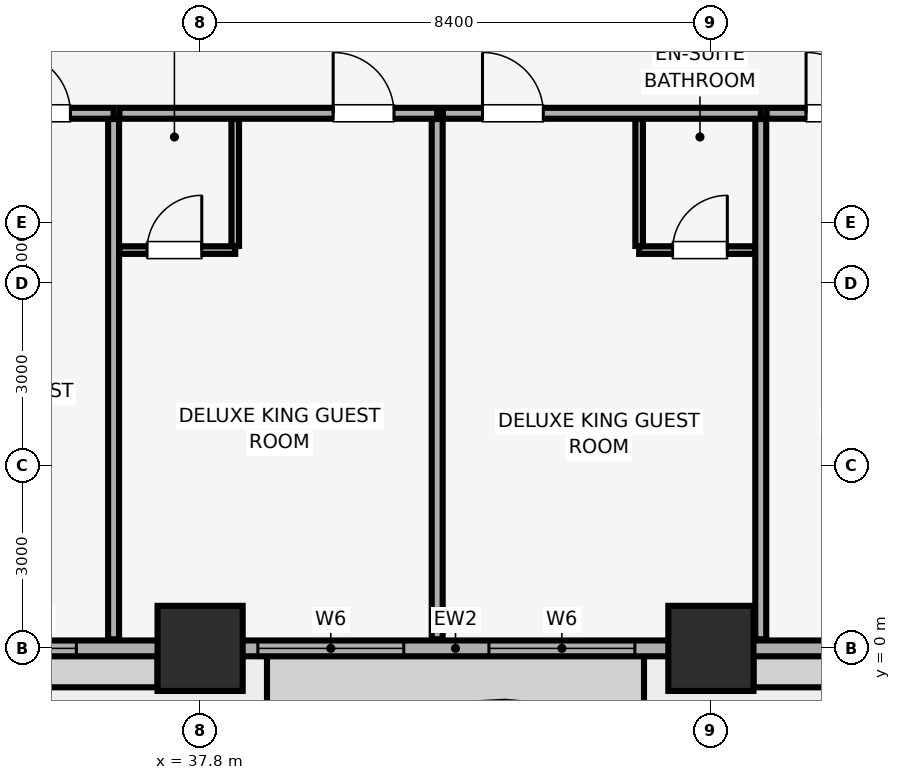
"""IFC4 building model, lengths in metres.
Left out: names, types, materials, properties, quantities, classifications, styles, units other than length and angle.
Written with IfcOpenShell. Run it as: python <this file> out.ifc"""

import sys

from ifc_helpers import new_model, si_unit, direction, frame, frame_2d, origin, origin_2d, place, context, subcontext, project, spatial, rectangle, extrude, element, fill, save


model = new_model("IFC4")
c1 = context("Model", 3, precision=1e-05, world=origin(), true_north=direction((0.0, 1.0)))
c2 = subcontext(c1, "Body", "Model", "MODEL_VIEW")
j1 = project(units=[si_unit("LENGTHUNIT", "METRE"), si_unit("PLANEANGLEUNIT", "RADIAN")], contexts=[c1])
p1 = place(None, origin())
s1 = spatial("IfcSite", under=j1, at=p1, CompositionType="ELEMENT")
p2 = place(p1, origin())
s2 = spatial("IfcBuilding", under=s1, at=p2, CompositionType="ELEMENT")
p3 = place(p2, frame((0.0, 0.0, 31.4)))
s3 = spatial("IfcBuildingStorey", under=s2, at=p3, CompositionType="ELEMENT", Elevation=31.4)
for number, where, z_axis, x_axis in (
    (1, (37.8, 0.0, 0.0), (0.0, 0.0, 1.0), (1.0, 0.0, 0.0)),
    (2, (46.2, 0.0, 0.0), (0.0, 0.0, 1.0), (1.0, 0.0, 0.0)),
):
    element("IfcColumn", number, at=place(p3, frame(where, z_axis=z_axis, x_axis=x_axis)), inside=s3, PredefinedType="COLUMN", context=c2, shape_type="SweptSolid", body=[
        extrude(rectangle(XDim=1.4, YDim=1.4, at=origin_2d()), origin(), (0.0, 0.0, 1.0), 3.51),
    ])
p4 = place(p3, frame((4.2, 0.0, 0.0), z_axis=(0.0, 0.0, 1.0), x_axis=(1.0, 0.0, 0.0)))
e3 = element("IfcWall", 3, at=p4, inside=s3, PredefinedType="SOLIDWALL", context=c2, shape_type="SweptSolid", body=[
    extrude(rectangle(XDim=75.6, YDim=0.26, at=frame_2d((37.8, 0.0))), origin(), (0.0, 0.0, 1.0), 2.56),
])
p5 = place(p4, frame((13.517, 0.0, 0.0)))
e4 = element("IfcOpeningElement", 4, at=p5, cuts=e3, PredefinedType="OPENING", context=c2, shape_type="SweptSolid", body=[
    extrude(rectangle(XDim=1.1, YDim=2.15, at=frame_2d((0.55, 1.075))), frame((0.0, 0.14, 0.0), z_axis=(0.0, -1.0, 0.0), x_axis=(1.0, 0.0, 0.0)), (0.0, 0.0, 1.0), 0.28),
])
p6 = place(p4, frame((28.183, 0.0, 0.0)))
e5 = element("IfcOpeningElement", 5, at=p6, cuts=e3, PredefinedType="OPENING", context=c2, shape_type="SweptSolid", body=[
    extrude(rectangle(XDim=1.1, YDim=2.15, at=frame_2d((0.55, 1.075))), frame((0.0, 0.14, 0.0), z_axis=(0.0, -1.0, 0.0), x_axis=(1.0, 0.0, 0.0)), (0.0, 0.0, 1.0), 0.28),
])
p7 = place(p4, frame((60.983, 0.0, 0.0)))
e6 = element("IfcOpeningElement", 6, at=p7, cuts=e3, PredefinedType="OPENING", context=c2, shape_type="SweptSolid", body=[
    extrude(rectangle(XDim=1.1, YDim=2.15, at=frame_2d((0.55, 1.075))), frame((0.0, 0.14, 0.0), z_axis=(0.0, -1.0, 0.0), x_axis=(1.0, 0.0, 0.0)), (0.0, 0.0, 1.0), 0.28),
])
p8 = place(p4, frame((1.035, 0.0, 0.85)))
e7 = element("IfcOpeningElement", 7, at=p8, cuts=e3, PredefinedType="OPENING", context=c2, shape_type="SweptSolid", body=[
    extrude(rectangle(XDim=2.4, YDim=1.5, at=frame_2d((1.2, 0.75))), frame((0.0, 0.14, 0.0), z_axis=(0.0, -1.0, 0.0), x_axis=(1.0, 0.0, 0.0)), (0.0, 0.0, 1.0), 0.28),
])
p9 = place(p4, frame((7.031, 0.0, 0.85)))
e8 = element("IfcOpeningElement", 8, at=p9, cuts=e3, PredefinedType="OPENING", context=c2, shape_type="SweptSolid", body=[
    extrude(rectangle(XDim=2.4, YDim=1.5, at=frame_2d((1.2, 0.75))), frame((0.0, 0.14, 0.0), z_axis=(0.0, -1.0, 0.0), x_axis=(1.0, 0.0, 0.0)), (0.0, 0.0, 1.0), 0.28),
])
p10 = place(p4, frame((16.757, 0.0, 0.85)))
e9 = element("IfcOpeningElement", 9, at=p10, cuts=e3, PredefinedType="OPENING", context=c2, shape_type="SweptSolid", body=[
    extrude(rectangle(XDim=1.5, YDim=1.4, at=frame_2d((0.75, 0.7))), frame((0.0, 0.14, 0.0), z_axis=(0.0, -1.0, 0.0), x_axis=(1.0, 0.0, 0.0)), (0.0, 0.0, 1.0), 0.28),
])
p11 = place(p4, frame((22.567, 0.0, 0.85)))
e10 = element("IfcOpeningElement", 10, at=p11, cuts=e3, PredefinedType="OPENING", context=c2, shape_type="SweptSolid", body=[
    extrude(rectangle(XDim=2.4, YDim=1.5, at=frame_2d((1.2, 0.75))), frame((0.0, 0.14, 0.0), z_axis=(0.0, -1.0, 0.0), x_axis=(1.0, 0.0, 0.0)), (0.0, 0.0, 1.0), 0.28),
])
p12 = place(p4, frame((30.065, 0.0, 0.85)))
e11 = element("IfcOpeningElement", 11, at=p12, cuts=e3, PredefinedType="OPENING", context=c2, shape_type="SweptSolid", body=[
    extrude(rectangle(XDim=1.5, YDim=1.4, at=frame_2d((0.75, 0.7))), frame((0.0, 0.14, 0.0), z_axis=(0.0, -1.0, 0.0), x_axis=(1.0, 0.0, 0.0)), (0.0, 0.0, 1.0), 0.28),
])
p13 = place(p4, frame((34.55, 0.0, 0.85)))
e12 = element("IfcOpeningElement", 12, at=p13, cuts=e3, PredefinedType="OPENING", context=c2, shape_type="SweptSolid", body=[
    extrude(rectangle(XDim=2.4, YDim=1.5, at=frame_2d((1.2, 0.75))), frame((0.0, 0.14, 0.0), z_axis=(0.0, -1.0, 0.0), x_axis=(1.0, 0.0, 0.0)), (0.0, 0.0, 1.0), 0.28),
])
p14 = place(p4, frame((38.35, 0.0, 0.85)))
e13 = element("IfcOpeningElement", 13, at=p14, cuts=e3, PredefinedType="OPENING", context=c2, shape_type="SweptSolid", body=[
    extrude(rectangle(XDim=2.4, YDim=1.5, at=frame_2d((1.2, 0.75))), frame((0.0, 0.14, 0.0), z_axis=(0.0, -1.0, 0.0), x_axis=(1.0, 0.0, 0.0)), (0.0, 0.0, 1.0), 0.28),
])
p15 = place(p4, frame((44.281, 0.0, 0.85)))
e14 = element("IfcOpeningElement", 14, at=p15, cuts=e3, PredefinedType="OPENING", context=c2, shape_type="SweptSolid", body=[
    extrude(rectangle(XDim=2.4, YDim=1.5, at=frame_2d((1.2, 0.75))), frame((0.0, 0.14, 0.0), z_axis=(0.0, -1.0, 0.0), x_axis=(1.0, 0.0, 0.0)), (0.0, 0.0, 1.0), 0.28),
])
p16 = place(p4, frame((50.332, 0.0, 0.85)))
e15 = element("IfcOpeningElement", 15, at=p16, cuts=e3, PredefinedType="OPENING", context=c2, shape_type="SweptSolid", body=[
    extrude(rectangle(XDim=2.4, YDim=1.5, at=frame_2d((1.2, 0.75))), frame((0.0, 0.14, 0.0), z_axis=(0.0, -1.0, 0.0), x_axis=(1.0, 0.0, 0.0)), (0.0, 0.0, 1.0), 0.28),
])
p17 = place(p4, frame((53.981, 0.0, 0.85)))
e16 = element("IfcOpeningElement", 16, at=p17, cuts=e3, PredefinedType="OPENING", context=c2, shape_type="SweptSolid", body=[
    extrude(rectangle(XDim=1.5, YDim=1.4, at=frame_2d((0.75, 0.7))), frame((0.0, 0.14, 0.0), z_axis=(0.0, -1.0, 0.0), x_axis=(1.0, 0.0, 0.0)), (0.0, 0.0, 1.0), 0.28),
])
p18 = place(p4, frame((64.759, 0.0, 0.85)))
e17 = element("IfcOpeningElement", 17, at=p18, cuts=e3, PredefinedType="OPENING", context=c2, shape_type="SweptSolid", body=[
    extrude(rectangle(XDim=1.5, YDim=1.4, at=frame_2d((0.75, 0.7))), frame((0.0, 0.14, 0.0), z_axis=(0.0, -1.0, 0.0), x_axis=(1.0, 0.0, 0.0)), (0.0, 0.0, 1.0), 0.28),
])
p19 = place(p4, frame((67.509, 0.0, 0.85)))
e18 = element("IfcOpeningElement", 18, at=p19, cuts=e3, PredefinedType="OPENING", context=c2, shape_type="SweptSolid", body=[
    extrude(rectangle(XDim=2.4, YDim=1.5, at=frame_2d((1.2, 0.75))), frame((0.0, 0.14, 0.0), z_axis=(0.0, -1.0, 0.0), x_axis=(1.0, 0.0, 0.0)), (0.0, 0.0, 1.0), 0.28),
])
p20 = place(p4, frame((72.165, 0.0, 0.85)))
e19 = element("IfcOpeningElement", 19, at=p20, cuts=e3, PredefinedType="OPENING", context=c2, shape_type="SweptSolid", body=[
    extrude(rectangle(XDim=2.4, YDim=1.5, at=frame_2d((1.2, 0.75))), frame((0.0, 0.14, 0.0), z_axis=(0.0, -1.0, 0.0), x_axis=(1.0, 0.0, 0.0)), (0.0, 0.0, 1.0), 0.28),
])
p21 = place(p3, frame((31.151, 8.8, 0.0), z_axis=(0.0, 0.0, 1.0), x_axis=(1.0, 0.0, 0.0)))
e20 = element("IfcWall", 20, at=p21, inside=s3, PredefinedType="PARTITIONING", context=c2, shape_type="SweptSolid", body=[
    extrude(rectangle(XDim=5.226, YDim=0.18, at=frame_2d((2.613, 0.0))), origin(), (0.0, 0.0, 1.0), 3.51),
])
p22 = place(p21, frame((3.516, 0.0, 0.0)))
e21 = element("IfcOpeningElement", 21, at=p22, cuts=e20, PredefinedType="OPENING", context=c2, shape_type="SweptSolid", body=[
    extrude(rectangle(XDim=1.0, YDim=2.15, at=frame_2d((0.5, 1.075))), frame((0.0, 0.1, 0.0), z_axis=(0.0, -1.0, 0.0), x_axis=(1.0, 0.0, 0.0)), (0.0, 0.0, 1.0), 0.2),
])
p23 = place(p3, frame((36.377, 0.15, 0.0), z_axis=(0.0, 0.0, 1.0), x_axis=(0.0, 1.0, 0.0)))
e22 = element("IfcWall", 22, at=p23, inside=s3, PredefinedType="PARTITIONING", context=c2, shape_type="SweptSolid", body=[
    extrude(rectangle(XDim=8.555, YDim=0.18, at=frame_2d((4.278, 0.0))), origin(), (0.0, 0.0, 1.0), 3.51),
])
p24 = place(p3, frame((36.472, 8.8, 0.0), z_axis=(0.0, 0.0, 1.0), x_axis=(1.0, 0.0, 0.0)))
e23 = element("IfcWall", 23, at=p24, inside=s3, PredefinedType="PARTITIONING", context=c2, shape_type="SweptSolid", body=[
    extrude(rectangle(XDim=5.226, YDim=0.18, at=frame_2d((2.613, 0.0))), origin(), (0.0, 0.0, 1.0), 3.51),
])
p25 = place(p24, frame((3.516, 0.0, 0.0)))
e24 = element("IfcOpeningElement", 24, at=p25, cuts=e23, PredefinedType="OPENING", context=c2, shape_type="SweptSolid", body=[
    extrude(rectangle(XDim=1.0, YDim=2.15, at=frame_2d((0.5, 1.075))), frame((0.0, 0.1, 0.0), z_axis=(0.0, -1.0, 0.0), x_axis=(1.0, 0.0, 0.0)), (0.0, 0.0, 1.0), 0.2),
])
p26 = place(p3, frame((41.699, 0.15, 0.0), z_axis=(0.0, 0.0, 1.0), x_axis=(0.0, 1.0, 0.0)))
e25 = element("IfcWall", 25, at=p26, inside=s3, PredefinedType="PARTITIONING", context=c2, shape_type="SweptSolid", body=[
    extrude(rectangle(XDim=8.555, YDim=0.18, at=frame_2d((4.278, 0.0))), origin(), (0.0, 0.0, 1.0), 3.51),
])
p27 = place(p3, frame((36.472, 6.55, 0.0), z_axis=(0.0, 0.0, 1.0), x_axis=(1.0, 0.0, 0.0)))
e26 = element("IfcWall", 26, at=p27, inside=s3, PredefinedType="PARTITIONING", context=c2, shape_type="SweptSolid", body=[
    extrude(rectangle(XDim=1.905, YDim=0.125, at=frame_2d((0.953, 0.0))), origin(), (0.0, 0.0, 1.0), 3.51),
])
p28 = place(p27, frame((0.455, 0.0, 0.0)))
e27 = element("IfcOpeningElement", 27, at=p28, cuts=e26, PredefinedType="OPENING", context=c2, shape_type="SweptSolid", body=[
    extrude(rectangle(XDim=0.9, YDim=2.1, at=frame_2d((0.45, 1.05))), frame((0.0, 0.073, 0.0), z_axis=(0.0, -1.0, 0.0), x_axis=(1.0, 0.0, 0.0)), (0.0, 0.0, 1.0), 0.145),
])
p29 = place(p3, frame((38.377, 6.617, 0.0), z_axis=(0.0, 0.0, 1.0), x_axis=(0.0, 1.0, 0.0)))
e28 = element("IfcWall", 28, at=p29, inside=s3, PredefinedType="PARTITIONING", context=c2, shape_type="SweptSolid", body=[
    extrude(rectangle(XDim=2.088, YDim=0.125, at=frame_2d((1.044, 0.0))), origin(), (0.0, 0.0, 1.0), 3.51),
])
p30 = place(p3, frame((41.794, 8.8, 0.0), z_axis=(0.0, 0.0, 1.0), x_axis=(1.0, 0.0, 0.0)))
e29 = element("IfcWall", 29, at=p30, inside=s3, PredefinedType="PARTITIONING", context=c2, shape_type="SweptSolid", body=[
    extrude(rectangle(XDim=5.226, YDim=0.18, at=frame_2d((2.613, 0.0))), origin(), (0.0, 0.0, 1.0), 3.51),
])
p31 = place(p30, frame((0.65, 0.0, 0.0)))
e30 = element("IfcOpeningElement", 30, at=p31, cuts=e29, PredefinedType="OPENING", context=c2, shape_type="SweptSolid", body=[
    extrude(rectangle(XDim=1.0, YDim=2.15, at=frame_2d((0.5, 1.075))), frame((0.0, 0.1, 0.0), z_axis=(0.0, -1.0, 0.0), x_axis=(1.0, 0.0, 0.0)), (0.0, 0.0, 1.0), 0.2),
])
p32 = place(p3, frame((47.02, 0.15, 0.0), z_axis=(0.0, 0.0, 1.0), x_axis=(0.0, 1.0, 0.0)))
e31 = element("IfcWall", 31, at=p32, inside=s3, PredefinedType="PARTITIONING", context=c2, shape_type="SweptSolid", body=[
    extrude(rectangle(XDim=8.555, YDim=0.18, at=frame_2d((4.278, 0.0))), origin(), (0.0, 0.0, 1.0), 3.51),
])
p33 = place(p3, frame((45.02, 6.55, 0.0), z_axis=(0.0, 0.0, 1.0), x_axis=(1.0, 0.0, 0.0)))
e32 = element("IfcWall", 32, at=p33, inside=s3, PredefinedType="PARTITIONING", context=c2, shape_type="SweptSolid", body=[
    extrude(rectangle(XDim=1.905, YDim=0.125, at=frame_2d((0.953, 0.0))), origin(), (0.0, 0.0, 1.0), 3.51),
])
p34 = place(p33, frame((0.55, 0.0, 0.0)))
e33 = element("IfcOpeningElement", 33, at=p34, cuts=e32, PredefinedType="OPENING", context=c2, shape_type="SweptSolid", body=[
    extrude(rectangle(XDim=0.9, YDim=2.1, at=frame_2d((0.45, 1.05))), frame((0.0, 0.073, 0.0), z_axis=(0.0, -1.0, 0.0), x_axis=(1.0, 0.0, 0.0)), (0.0, 0.0, 1.0), 0.145),
])
p35 = place(p3, frame((45.02, 6.617, 0.0), z_axis=(0.0, 0.0, 1.0), x_axis=(0.0, 1.0, 0.0)))
e34 = element("IfcWall", 34, at=p35, inside=s3, PredefinedType="PARTITIONING", context=c2, shape_type="SweptSolid", body=[
    extrude(rectangle(XDim=2.088, YDim=0.125, at=frame_2d((1.044, 0.0))), origin(), (0.0, 0.0, 1.0), 3.51),
])
p36 = place(p3, frame((47.115, 8.8, 0.0), z_axis=(0.0, 0.0, 1.0), x_axis=(1.0, 0.0, 0.0)))
e35 = element("IfcWall", 35, at=p36, inside=s3, PredefinedType="PARTITIONING", context=c2, shape_type="SweptSolid", body=[
    extrude(rectangle(XDim=5.226, YDim=0.18, at=frame_2d((2.613, 0.0))), origin(), (0.0, 0.0, 1.0), 3.51),
])
p37 = place(p36, frame((0.65, 0.0, 0.0)))
e36 = element("IfcOpeningElement", 36, at=p37, cuts=e35, PredefinedType="OPENING", context=c2, shape_type="SweptSolid", body=[
    extrude(rectangle(XDim=1.0, YDim=2.15, at=frame_2d((0.5, 1.075))), frame((0.0, 0.1, 0.0), z_axis=(0.0, -1.0, 0.0), x_axis=(1.0, 0.0, 0.0)), (0.0, 0.0, 1.0), 0.2),
])
p38 = place(p12, origin())
e37 = element("IfcWindow", 37, at=p38, inside=s3, PartitioningType="SINGLE_PANEL", PredefinedType="WINDOW", context=c2, shape_type="SweptSolid", body=[
    extrude(rectangle(XDim=1.5, YDim=1.4, at=frame_2d((0.75, 0.7))), frame((0.0, 0.03, 0.0), z_axis=(0.0, -1.0, 0.0), x_axis=(1.0, 0.0, 0.0)), (0.0, 0.0, 1.0), 0.06),
])
fill(e11, e37)
p39 = place(p13, origin())
e38 = element("IfcWindow", 38, at=p39, inside=s3, PartitioningType="SINGLE_PANEL", PredefinedType="WINDOW", context=c2, shape_type="SweptSolid", body=[
    extrude(rectangle(XDim=2.4, YDim=1.5, at=frame_2d((1.2, 0.75))), frame((0.0, 0.03, 0.0), z_axis=(0.0, -1.0, 0.0), x_axis=(1.0, 0.0, 0.0)), (0.0, 0.0, 1.0), 0.06),
])
fill(e12, e38)
p40 = place(p14, origin())
e39 = element("IfcWindow", 39, at=p40, inside=s3, PartitioningType="SINGLE_PANEL", PredefinedType="WINDOW", context=c2, shape_type="SweptSolid", body=[
    extrude(rectangle(XDim=2.4, YDim=1.5, at=frame_2d((1.2, 0.75))), frame((0.0, 0.03, 0.0), z_axis=(0.0, -1.0, 0.0), x_axis=(1.0, 0.0, 0.0)), (0.0, 0.0, 1.0), 0.06),
])
fill(e13, e39)
p41 = place(p22, origin())
e40 = element("IfcDoor", 40, at=p41, inside=s3, OperationType="SINGLE_SWING_LEFT", PredefinedType="DOOR", context=c2, shape_type="SweptSolid", body=[
    extrude(rectangle(XDim=1.0, YDim=2.15, at=frame_2d((0.5, 1.075))), frame((0.0, 0.025, 0.0), z_axis=(0.0, -1.0, 0.0), x_axis=(1.0, 0.0, 0.0)), (0.0, 0.0, 1.0), 0.05),
])
fill(e21, e40)
p42 = place(p25, origin())
e41 = element("IfcDoor", 41, at=p42, inside=s3, OperationType="SINGLE_SWING_LEFT", PredefinedType="DOOR", context=c2, shape_type="SweptSolid", body=[
    extrude(rectangle(XDim=1.0, YDim=2.15, at=frame_2d((0.5, 1.075))), frame((0.0, 0.025, 0.0), z_axis=(0.0, -1.0, 0.0), x_axis=(1.0, 0.0, 0.0)), (0.0, 0.0, 1.0), 0.05),
])
fill(e24, e41)
p43 = place(p28, origin())
e42 = element("IfcDoor", 42, at=p43, inside=s3, OperationType="SINGLE_SWING_RIGHT", PredefinedType="DOOR", context=c2, shape_type="SweptSolid", body=[
    extrude(rectangle(XDim=0.9, YDim=2.1, at=frame_2d((0.45, 1.05))), frame((0.0, 0.025, 0.0), z_axis=(0.0, -1.0, 0.0), x_axis=(1.0, 0.0, 0.0)), (0.0, 0.0, 1.0), 0.05),
])
fill(e27, e42)
p44 = place(p31, origin())
e43 = element("IfcDoor", 43, at=p44, inside=s3, OperationType="SINGLE_SWING_LEFT", PredefinedType="DOOR", context=c2, shape_type="SweptSolid", body=[
    extrude(rectangle(XDim=1.0, YDim=2.15, at=frame_2d((0.5, 1.075))), frame((0.0, 0.025, 0.0), z_axis=(0.0, -1.0, 0.0), x_axis=(1.0, 0.0, 0.0)), (0.0, 0.0, 1.0), 0.05),
])
fill(e30, e43)
p45 = place(p34, origin())
e44 = element("IfcDoor", 44, at=p45, inside=s3, OperationType="SINGLE_SWING_RIGHT", PredefinedType="DOOR", context=c2, shape_type="SweptSolid", body=[
    extrude(rectangle(XDim=0.9, YDim=2.1, at=frame_2d((0.45, 1.05))), frame((0.0, 0.025, 0.0), z_axis=(0.0, -1.0, 0.0), x_axis=(1.0, 0.0, 0.0)), (0.0, 0.0, 1.0), 0.05),
])
fill(e33, e44)
p46 = place(p37, origin())
e45 = element("IfcDoor", 45, at=p46, inside=s3, OperationType="SINGLE_SWING_LEFT", PredefinedType="DOOR", context=c2, shape_type="SweptSolid", body=[
    extrude(rectangle(XDim=1.0, YDim=2.15, at=frame_2d((0.5, 1.075))), frame((0.0, 0.025, 0.0), z_axis=(0.0, -1.0, 0.0), x_axis=(1.0, 0.0, 0.0)), (0.0, 0.0, 1.0), 0.05),
])
fill(e36, e45)
save(model, sys.argv[1])
